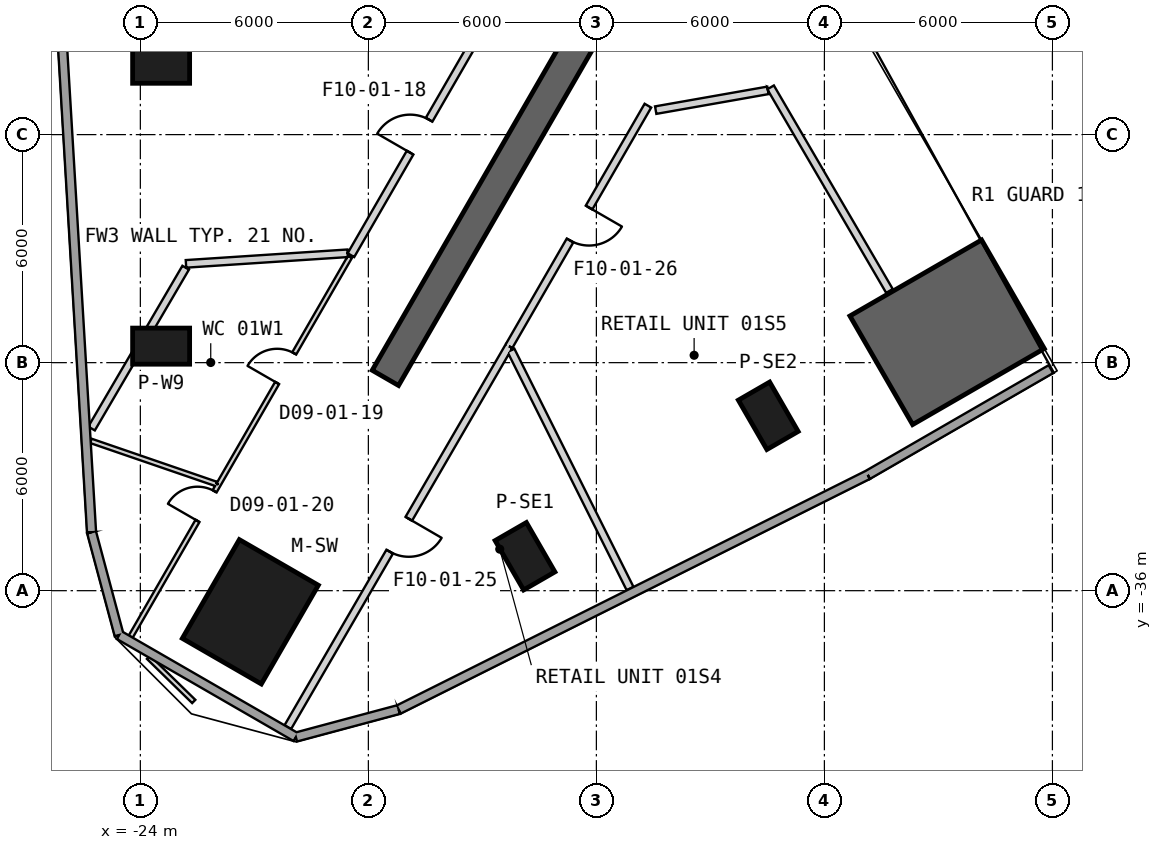
"""IFC4 building model, lengths in metres.
Left out: names, types, materials, properties, quantities, classifications, styles, units other than length and angle.
Written with IfcOpenShell. Run it as: python <this file> out.ifc"""

import sys

from ifc_helpers import new_model, si_unit, direction, frame, frame_2d, origin, origin_2d, place, context, subcontext, project, spatial, polyline, rectangle, outline, extrude, element, fill, save


model = new_model("IFC4")
c1 = context("Model", 3, precision=1e-05, world=origin(), true_north=direction((0.0, 1.0)))
c2 = subcontext(c1, "Body", "Model", "MODEL_VIEW")
j1 = project(units=[si_unit("LENGTHUNIT", "METRE"), si_unit("PLANEANGLEUNIT", "RADIAN")], contexts=[c1])
p1 = place(None, origin())
s1 = spatial("IfcSite", under=j1, at=p1, CompositionType="ELEMENT")
p2 = place(p1, origin())
s2 = spatial("IfcBuilding", under=s1, at=p2, CompositionType="ELEMENT")
p3 = place(p2, frame((0.0, 0.0, 9.0)))
s3 = spatial("IfcBuildingStorey", under=s2, at=p3, CompositionType="ELEMENT", Elevation=9.0)
p4 = place(p3, frame((-21.106, -36.556, 0.0), z_axis=(0.0, 0.0, 1.0), x_axis=(-0.5, -0.866025403784, 0.0)))
e1 = element("IfcColumn", 1, at=p4, inside=s3, PredefinedType="COLUMN", context=c2, shape_type="SweptSolid", body=[
    extrude(rectangle(XDim=3.0, YDim=2.4, at=origin_2d()), origin(), (0.0, 0.0, 1.0), 6.5),
])
for number, where, z_axis, x_axis in (
    (2, (-23.453, -22.174, 0.0), (0.0, 0.0, 1.0), (-1.0, 0.0, 0.0)),
    (3, (-23.453, -29.566, 0.0), (0.0, 0.0, 1.0), (-1.0, 0.0, 0.0)),
    (4, (-13.878, -35.094, 0.0), (0.0, 0.0, 1.0), (0.5, -0.866, 0.0)),
    (5, (-7.477, -31.398, 0.0), (0.0, 0.0, 1.0), (0.5, -0.866, 0.0)),
):
    element("IfcColumn", number, at=place(p3, frame(where, z_axis=z_axis, x_axis=x_axis)), inside=s3, PredefinedType="COLUMN", context=c2, shape_type="SweptSolid", body=[
        extrude(rectangle(XDim=1.5, YDim=0.95, at=origin_2d()), origin(), (0.0, 0.0, 1.0), 6.5),
    ])
p5 = place(p3, frame((-10.575, -18.316, 0.0), z_axis=(0.0, 0.0, 1.0), x_axis=(-0.499996575515, -0.866027380903, 0.0)))
e6 = element("IfcWall", 6, at=p5, inside=s3, PredefinedType="SHEAR", context=c2, shape_type="SweptSolid", body=[
    extrude(rectangle(XDim=13.954, YDim=0.8, at=frame_2d((6.977, 0.0))), origin(), (0.0, 0.0, 1.0), 6.5),
])
p6 = place(p5, frame((2.05, 0.0, 0.0)))
e7 = element("IfcOpeningElement", 7, at=p6, cuts=e6, PredefinedType="OPENING", context=c2, shape_type="SweptSolid", body=[
    extrude(rectangle(XDim=1.4, YDim=2.4, at=frame_2d((0.7, 1.2))), frame((0.0, 0.41, 0.0), z_axis=(0.0, -1.0, 0.0), x_axis=(1.0, 0.0, 0.0)), (0.0, 0.0, 1.0), 0.82),
])
p7 = place(p3, origin())
e8 = element("IfcWall", 8, at=p7, inside=s3, PredefinedType="SHEAR", context=c2, shape_type="SweptSolid", body=[
    extrude(outline(polyline([(-3.678, -31.63), (-0.214, -29.63), (-1.864, -26.772), (-5.328, -28.772), (-3.678, -31.63)])), origin(), (0.0, 0.0, 1.0), 6.5),
])
p8 = place(p3, frame((-26.107, -20.685, 0.0), z_axis=(0.0, 0.0, 1.0), x_axis=(0.059596169304, -0.998222568671, 0.0)))
e9 = element("IfcWall", 9, at=p8, inside=s3, PredefinedType="SOLIDWALL", context=c2, shape_type="SweptSolid", body=[
    extrude(rectangle(XDim=13.801, YDim=0.24, at=frame_2d((6.901, 0.0))), origin(), (0.0, 0.0, 1.0), 6.2),
])
p9 = place(p3, frame((-25.284, -34.462, 0.0), z_axis=(0.0, 0.0, 1.0), x_axis=(0.258850842196, -0.965917305723, 0.0)))
e10 = element("IfcWall", 10, at=p9, inside=s3, PredefinedType="SOLIDWALL", context=c2, shape_type="SweptSolid", body=[
    extrude(rectangle(XDim=2.8, YDim=0.24, at=frame_2d((1.4, 0.0))), origin(), (0.0, 0.0, 1.0), 6.2),
])
p10 = place(p3, frame((-24.56, -37.167, 0.0), z_axis=(0.0, 0.0, 1.0), x_axis=(0.866010734295, -0.500025407441, 0.0)))
e11 = element("IfcWall", 11, at=p10, inside=s3, PredefinedType="SOLIDWALL", context=c2, shape_type="SweptSolid", body=[
    extrude(rectangle(XDim=5.371, YDim=0.24, at=frame_2d((2.686, 0.0))), origin(), (0.0, 0.0, 1.0), 6.2),
])
p11 = place(p3, frame((-19.908, -39.853, 0.0), z_axis=(0.0, 0.0, 1.0), x_axis=(0.965923146675, 0.25882904535, 0.0)))
e12 = element("IfcWall", 12, at=p11, inside=s3, PredefinedType="SOLIDWALL", context=c2, shape_type="SweptSolid", body=[
    extrude(rectangle(XDim=2.801, YDim=0.24, at=frame_2d((1.4, 0.0))), origin(), (0.0, 0.0, 1.0), 6.2),
])
p12 = place(p3, frame((-17.203, -39.128, 0.0), z_axis=(0.0, 0.0, 1.0), x_axis=(0.894377655106, 0.447312653573, 0.0)))
e13 = element("IfcWall", 13, at=p12, inside=s3, PredefinedType="SOLIDWALL", context=c2, shape_type="SweptSolid", body=[
    extrude(rectangle(XDim=13.802, YDim=0.24, at=frame_2d((6.901, 0.0))), origin(), (0.0, 0.0, 1.0), 6.2),
])
p13 = place(p3, frame((-4.859, -32.954, 0.0), z_axis=(0.0, 0.0, 1.0), x_axis=(0.865999312459, 0.500045188778, 0.0)))
e14 = element("IfcWall", 14, at=p13, inside=s3, PredefinedType="SOLIDWALL", context=c2, shape_type="SweptSolid", body=[
    extrude(rectangle(XDim=5.566, YDim=0.24, at=frame_2d((2.783, 0.0))), origin(), (0.0, 0.0, 1.0), 6.2),
])
p14 = place(p3, frame((-18.459, -27.172, 0.0), z_axis=(0.0, 0.0, 1.0), x_axis=(0.49998445949, 0.866034375916, 0.0)))
e15 = element("IfcWall", 15, at=p14, inside=s3, PredefinedType="PARTITIONING", context=c2, shape_type="SweptSolid", body=[
    extrude(rectangle(XDim=7.313, YDim=0.2, at=frame_2d((3.657, 0.0))), origin(), (0.0, 0.0, 1.0), 6.2),
])
p15 = place(p14, frame((3.115, 0.0, 0.0)))
e16 = element("IfcOpeningElement", 16, at=p15, cuts=e15, PredefinedType="OPENING", context=c2, shape_type="SweptSolid", body=[
    extrude(rectangle(XDim=1.0, YDim=2.1, at=frame_2d((0.5, 1.05))), frame((0.0, 0.11, 0.0), z_axis=(0.0, -1.0, 0.0), x_axis=(1.0, 0.0, 0.0)), (0.0, 0.0, 1.0), 0.22),
])
p16 = place(p3, frame((-24.255, -37.21, 0.0), z_axis=(0.0, 0.0, 1.0), x_axis=(0.500011914892, 0.866018524609, 0.0)))
e17 = element("IfcWall", 17, at=p16, inside=s3, PredefinedType="PARTITIONING", context=c2, shape_type="SweptSolid", body=[
    extrude(rectangle(XDim=4.624, YDim=0.12, at=frame_2d((2.312, 0.0))), origin(), (0.0, 0.0, 1.0), 6.2),
])
p17 = place(p16, frame((3.518, 0.0, 0.0)))
e18 = element("IfcOpeningElement", 18, at=p17, cuts=e17, PredefinedType="OPENING", context=c2, shape_type="SweptSolid", body=[
    extrude(rectangle(XDim=0.9, YDim=2.1, at=frame_2d((0.45, 1.05))), frame((0.0, 0.07, 0.0), z_axis=(0.0, -1.0, 0.0), x_axis=(1.0, 0.0, 0.0)), (0.0, 0.0, 1.0), 0.14),
])
p18 = place(p3, frame((-21.943, -33.206, 0.0), z_axis=(0.0, 0.0, 1.0), x_axis=(0.500001642027, 0.866024455758, 0.0)))
e19 = element("IfcWall", 19, at=p18, inside=s3, PredefinedType="PARTITIONING", context=c2, shape_type="SweptSolid", body=[
    extrude(rectangle(XDim=6.914, YDim=0.12, at=frame_2d((3.457, 0.0))), origin(), (0.0, 0.0, 1.0), 6.2),
])
p19 = place(p18, frame((3.084, 0.0, 0.0)))
e20 = element("IfcOpeningElement", 20, at=p19, cuts=e19, PredefinedType="OPENING", context=c2, shape_type="SweptSolid", body=[
    extrude(rectangle(XDim=0.9, YDim=2.1, at=frame_2d((0.45, 1.05))), frame((0.0, 0.07, 0.0), z_axis=(0.0, -1.0, 0.0), x_axis=(1.0, 0.0, 0.0)), (0.0, 0.0, 1.0), 0.14),
])
p20 = place(p3, frame((-23.785, -37.753, 0.0), z_axis=(0.0, 0.0, 1.0), x_axis=(0.715638818435, -0.698470530193, 0.0)))
e21 = element("IfcWall", 21, at=p20, inside=s3, PredefinedType="PARTITIONING", context=c2, shape_type="SweptSolid", body=[
    extrude(rectangle(XDim=1.664, YDim=0.12, at=frame_2d((0.832, 0.0))), origin(), (0.0, 0.0, 1.0), 6.2),
])
p21 = place(p3, frame((-22.799, -27.401, 0.0), z_axis=(0.0, 0.0, 1.0), x_axis=(0.997858297663, 0.065412672977, 0.0)))
e22 = element("IfcWall", 22, at=p21, inside=s3, PredefinedType="PARTITIONING", context=c2, shape_type="SweptSolid", body=[
    extrude(rectangle(XDim=4.262, YDim=0.2, at=frame_2d((2.131, 0.0))), origin(), (0.0, 0.0, 1.0), 5.28),
])
p22 = place(p3, frame((-25.284, -31.733, 0.0), z_axis=(0.0, 0.0, 1.0), x_axis=(0.505158397, 0.863026647295, 0.0)))
e23 = element("IfcWall", 23, at=p22, inside=s3, PredefinedType="PARTITIONING", context=c2, shape_type="SweptSolid", body=[
    extrude(rectangle(XDim=4.903, YDim=0.2, at=frame_2d((2.452, 0.0))), origin(), (0.0, 0.0, 1.0), 6.2),
])
p23 = place(p3, frame((-25.303, -32.058, 0.0), z_axis=(0.0, 0.0, 1.0), x_axis=(0.945753144858, -0.324886116956, 0.0)))
e24 = element("IfcWall", 24, at=p23, inside=s3, PredefinedType="PARTITIONING", context=c2, shape_type="SweptSolid", body=[
    extrude(rectangle(XDim=3.488, YDim=0.12, at=frame_2d((1.744, 0.0))), origin(), (0.0, 0.0, 1.0), 6.2),
])
p24 = place(p3, frame((-14.3, -29.568, 0.0), z_axis=(0.0, 0.0, 1.0), x_axis=(-0.502133484881, -0.864790126772, 0.0)))
e25 = element("IfcWall", 25, at=p24, inside=s3, PredefinedType="PARTITIONING", context=c2, shape_type="SweptSolid", body=[
    extrude(rectangle(XDim=11.591, YDim=0.2, at=frame_2d((5.795, 0.0))), origin(), (0.0, 0.0, 1.0), 6.2),
])
p25 = place(p24, frame((5.25, 0.0, 0.0)))
e26 = element("IfcOpeningElement", 26, at=p25, cuts=e25, PredefinedType="OPENING", context=c2, shape_type="SweptSolid", body=[
    extrude(rectangle(XDim=1.0, YDim=2.1, at=frame_2d((0.5, 1.05))), frame((0.0, 0.11, 0.0), z_axis=(0.0, -1.0, 0.0), x_axis=(1.0, 0.0, 0.0)), (0.0, 0.0, 1.0), 0.22),
])
p26 = place(p3, frame((-7.416, -22.757, 0.0), z_axis=(0.0, 0.0, 1.0), x_axis=(0.504238037334, -0.863564706149, 0.0)))
e27 = element("IfcWall", 27, at=p26, inside=s3, PredefinedType="PARTITIONING", context=c2, shape_type="SweptSolid", body=[
    extrude(rectangle(XDim=6.203, YDim=0.2, at=frame_2d((3.102, 0.0))), origin(), (0.0, 0.0, 1.0), 5.57),
])
p27 = place(p3, frame((-10.439, -23.356, 0.0), z_axis=(0.0, 0.0, 1.0), x_axis=(0.984852321706, 0.17339522609, 0.0)))
e28 = element("IfcWall", 28, at=p27, inside=s3, PredefinedType="PARTITIONING", context=c2, shape_type="SweptSolid", body=[
    extrude(rectangle(XDim=2.999, YDim=0.2, at=frame_2d((1.5, 0.0))), origin(), (0.0, 0.0, 1.0), 5.28),
])
p28 = place(p3, frame((-10.644, -23.238, 0.0), z_axis=(0.0, 0.0, 1.0), x_axis=(-0.500076141041, -0.865981439271, 0.0)))
e29 = element("IfcWall", 29, at=p28, inside=s3, PredefinedType="PARTITIONING", context=c2, shape_type="SweptSolid", body=[
    extrude(rectangle(XDim=7.309, YDim=0.2, at=frame_2d((3.655, 0.0))), origin(), (0.0, 0.0, 1.0), 6.2),
])
p29 = place(p28, frame((3.096, 0.0, 0.0)))
e30 = element("IfcOpeningElement", 30, at=p29, cuts=e29, PredefinedType="OPENING", context=c2, shape_type="SweptSolid", body=[
    extrude(rectangle(XDim=1.0, YDim=2.1, at=frame_2d((0.5, 1.05))), frame((0.0, 0.11, 0.0), z_axis=(0.0, -1.0, 0.0), x_axis=(1.0, 0.0, 0.0)), (0.0, 0.0, 1.0), 0.22),
])
p30 = place(p3, frame((-14.248, -29.677, 0.0), z_axis=(0.0, 0.0, 1.0), x_axis=(0.447311167727, -0.894378398233, 0.0)))
e31 = element("IfcWall", 31, at=p30, inside=s3, PredefinedType="PARTITIONING", context=c2, shape_type="SweptSolid", body=[
    extrude(rectangle(XDim=7.006, YDim=0.2, at=frame_2d((3.503, 0.0))), origin(), (0.0, 0.0, 1.0), 5.28),
])
p31 = place(p15, origin())
e32 = element("IfcDoor", 32, at=p31, inside=s3, OperationType="SINGLE_SWING_LEFT", PredefinedType="USERDEFINED", context=c2, shape_type="SweptSolid", body=[
    extrude(rectangle(XDim=1.0, YDim=2.1, at=frame_2d((0.5, 1.05))), frame((0.0, 0.025, 0.0), z_axis=(0.0, -1.0, 0.0), x_axis=(1.0, 0.0, 0.0)), (0.0, 0.0, 1.0), 0.05),
])
fill(e16, e32)
p32 = place(p19, origin())
e33 = element("IfcDoor", 33, at=p32, inside=s3, OperationType="SINGLE_SWING_LEFT", PredefinedType="NOTDEFINED", context=c2, shape_type="SweptSolid", body=[
    extrude(rectangle(XDim=0.9, YDim=2.1, at=frame_2d((0.45, 1.05))), frame((0.0, 0.025, 0.0), z_axis=(0.0, -1.0, 0.0), x_axis=(1.0, 0.0, 0.0)), (0.0, 0.0, 1.0), 0.05),
])
fill(e20, e33)
p33 = place(p17, origin())
e34 = element("IfcDoor", 34, at=p33, inside=s3, OperationType="SINGLE_SWING_LEFT", PredefinedType="NOTDEFINED", context=c2, shape_type="SweptSolid", body=[
    extrude(rectangle(XDim=0.9, YDim=2.1, at=frame_2d((0.45, 1.05))), frame((0.0, 0.025, 0.0), z_axis=(0.0, -1.0, 0.0), x_axis=(1.0, 0.0, 0.0)), (0.0, 0.0, 1.0), 0.05),
])
fill(e18, e34)
p34 = place(p25, origin())
e35 = element("IfcDoor", 35, at=p34, inside=s3, OperationType="SINGLE_SWING_LEFT", PredefinedType="USERDEFINED", context=c2, shape_type="SweptSolid", body=[
    extrude(rectangle(XDim=1.0, YDim=2.1, at=frame_2d((0.5, 1.05))), frame((0.0, 0.025, 0.0), z_axis=(0.0, -1.0, 0.0), x_axis=(1.0, 0.0, 0.0)), (0.0, 0.0, 1.0), 0.05),
])
fill(e26, e35)
p35 = place(p29, origin())
e36 = element("IfcDoor", 36, at=p35, inside=s3, OperationType="SINGLE_SWING_LEFT", PredefinedType="USERDEFINED", context=c2, shape_type="SweptSolid", body=[
    extrude(rectangle(XDim=1.0, YDim=2.1, at=frame_2d((0.5, 1.05))), frame((0.0, 0.025, 0.0), z_axis=(0.0, -1.0, 0.0), x_axis=(1.0, 0.0, 0.0)), (0.0, 0.0, 1.0), 0.05),
])
fill(e30, e36)
save(model, sys.argv[1])
